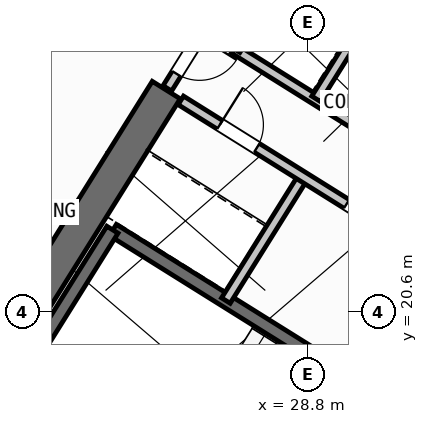
"""IFC4 building model, lengths in metres.
Left out: names, types, materials, properties, quantities, classifications, styles, units other than length and angle.
Written with IfcOpenShell. Run it as: python <this file> out.ifc"""

import sys

from ifc_helpers import new_model, si_unit, direction, frame, frame_2d, origin, place, context, subcontext, project, spatial, rectangle, extrude, source, transform, mapped, element, fill, save


model = new_model("IFC4")
c1 = context("Model", 3, precision=1e-05, world=origin(), true_north=direction((0.0, 1.0)))
c2 = subcontext(c1, "Body", "Model", "MODEL_VIEW")
j1 = project(units=[si_unit("LENGTHUNIT", "METRE"), si_unit("PLANEANGLEUNIT", "RADIAN")], contexts=[c1])
p1 = place(None, origin())
s1 = spatial("IfcSite", under=j1, at=p1, CompositionType="ELEMENT")
p2 = place(p1, origin())
s2 = spatial("IfcBuilding", under=s1, at=p2, CompositionType="ELEMENT")
p3 = place(p2, frame((0.0, 0.0, 27.6)))
s3 = spatial("IfcBuildingStorey", under=s2, at=p3, CompositionType="ELEMENT", Elevation=27.6)
p4 = place(p3, frame((40.615, 23.983, 0.0), z_axis=(0.0, 0.0, 1.0), x_axis=(-0.848045953968, 0.529922692436, 0.0)))
e1 = element("IfcWall", 1, at=p4, inside=s3, PredefinedType="SHEAR", context=c2, shape_type="SweptSolid", body=[
    extrude(rectangle(XDim=13.24, YDim=0.65, at=frame_2d((6.62, 0.0))), origin(), (0.0, 0.0, 1.0), 3.35),
])
p5 = place(p3, frame((26.007, 24.976, 0.0), z_axis=(0.0, 0.0, 1.0), x_axis=(-0.529916319127, -0.848049936456, 0.0)))
e2 = element("IfcWall", 2, at=p5, inside=s3, PredefinedType="SHEAR", context=c2, shape_type="SweptSolid", body=[
    extrude(rectangle(XDim=6.375, YDim=0.65, at=frame_2d((3.188, 0.0))), origin(), (0.0, 0.0, 1.0), 3.35),
])
p6 = place(p3, frame((29.268, 6.429, 0.0), z_axis=(0.0, 0.0, 1.0), x_axis=(-0.848049971435, 0.529916263149, 0.0)))
e3 = element("IfcWall", 3, at=p6, inside=s3, PredefinedType="STANDARD", context=c2, shape_type="SweptSolid", body=[
    extrude(rectangle(XDim=31.588, YDim=0.32, at=frame_2d((15.794, 0.0))), origin(), (0.0, 0.0, 1.0), 3.35),
])
p7 = place(p6, frame((16.362, 0.0, 0.0)))
e4 = element("IfcOpeningElement", 4, at=p7, cuts=e3, PredefinedType="OPENING", context=c2, shape_type="SweptSolid", body=[
    extrude(rectangle(XDim=1.2, YDim=2.15, at=frame_2d((0.6, 1.075))), frame((0.0, 0.17, 0.0), z_axis=(0.0, -1.0, 0.0), x_axis=(1.0, 0.0, 0.0)), (0.0, 0.0, 1.0), 0.34),
])
p8 = place(p6, frame((2.989, 0.0, 0.8)))
e5 = element("IfcOpeningElement", 5, at=p8, cuts=e3, PredefinedType="OPENING", context=c2, shape_type="SweptSolid", body=[
    extrude(rectangle(XDim=2.1, YDim=1.55, at=frame_2d((1.05, 0.775))), frame((0.0, 0.17, 0.0), z_axis=(0.0, -1.0, 0.0), x_axis=(1.0, 0.0, 0.0)), (0.0, 0.0, 1.0), 0.34),
])
p9 = place(p6, frame((8.359, 0.0, 0.8)))
e6 = element("IfcOpeningElement", 6, at=p9, cuts=e3, PredefinedType="OPENING", context=c2, shape_type="SweptSolid", body=[
    extrude(rectangle(XDim=2.1, YDim=1.55, at=frame_2d((1.05, 0.775))), frame((0.0, 0.17, 0.0), z_axis=(0.0, -1.0, 0.0), x_axis=(1.0, 0.0, 0.0)), (0.0, 0.0, 1.0), 0.34),
])
p10 = place(p6, frame((13.284, 0.0, 0.95)))
e7 = element("IfcOpeningElement", 7, at=p10, cuts=e3, PredefinedType="OPENING", context=c2, shape_type="SweptSolid", body=[
    extrude(rectangle(XDim=1.2, YDim=1.4, at=frame_2d((0.6, 0.7))), frame((0.0, 0.17, 0.0), z_axis=(0.0, -1.0, 0.0), x_axis=(1.0, 0.0, 0.0)), (0.0, 0.0, 1.0), 0.34),
])
p11 = place(p6, frame((29.188, 0.0, 0.95)))
e8 = element("IfcOpeningElement", 8, at=p11, cuts=e3, PredefinedType="OPENING", context=c2, shape_type="SweptSolid", body=[
    extrude(rectangle(XDim=1.2, YDim=1.4, at=frame_2d((0.6, 0.7))), frame((0.0, 0.17, 0.0), z_axis=(0.0, -1.0, 0.0), x_axis=(1.0, 0.0, 0.0)), (0.0, 0.0, 1.0), 0.34),
])
p12 = place(p6, frame((19.11, 0.0, 1.0)))
e9 = element("IfcOpeningElement", 9, at=p12, cuts=e3, PredefinedType="OPENING", context=c2, shape_type="SweptSolid", body=[
    extrude(rectangle(XDim=0.9, YDim=1.25, at=frame_2d((0.45, 0.625))), frame((0.0, 0.17, 0.0), z_axis=(0.0, -1.0, 0.0), x_axis=(1.0, 0.0, 0.0)), (0.0, 0.0, 1.0), 0.34),
])
p13 = place(p6, frame((21.226, 0.0, 1.0)))
e10 = element("IfcOpeningElement", 10, at=p13, cuts=e3, PredefinedType="OPENING", context=c2, shape_type="SweptSolid", body=[
    extrude(rectangle(XDim=0.9, YDim=1.25, at=frame_2d((0.45, 0.625))), frame((0.0, 0.17, 0.0), z_axis=(0.0, -1.0, 0.0), x_axis=(1.0, 0.0, 0.0)), (0.0, 0.0, 1.0), 0.34),
])
p14 = place(p6, frame((23.014, 0.0, 1.0)))
e11 = element("IfcOpeningElement", 11, at=p14, cuts=e3, PredefinedType="OPENING", context=c2, shape_type="SweptSolid", body=[
    extrude(rectangle(XDim=0.9, YDim=1.25, at=frame_2d((0.45, 0.625))), frame((0.0, 0.17, 0.0), z_axis=(0.0, -1.0, 0.0), x_axis=(1.0, 0.0, 0.0)), (0.0, 0.0, 1.0), 0.34),
])
p15 = place(p6, frame((24.802, 0.0, 1.0)))
e12 = element("IfcOpeningElement", 12, at=p15, cuts=e3, PredefinedType="OPENING", context=c2, shape_type="SweptSolid", body=[
    extrude(rectangle(XDim=0.9, YDim=1.25, at=frame_2d((0.45, 0.625))), frame((0.0, 0.17, 0.0), z_axis=(0.0, -1.0, 0.0), x_axis=(1.0, 0.0, 0.0)), (0.0, 0.0, 1.0), 0.34),
])
p16 = place(p6, frame((26.59, 0.0, 1.0)))
e13 = element("IfcOpeningElement", 13, at=p16, cuts=e3, PredefinedType="OPENING", context=c2, shape_type="SweptSolid", body=[
    extrude(rectangle(XDim=0.9, YDim=1.25, at=frame_2d((0.45, 0.625))), frame((0.0, 0.17, 0.0), z_axis=(0.0, -1.0, 0.0), x_axis=(1.0, 0.0, 0.0)), (0.0, 0.0, 1.0), 0.34),
])
p17 = place(p3, frame((14.138, 41.825, 0.0), z_axis=(0.0, 0.0, 1.0), x_axis=(0.848046498049, -0.529921821731, 0.0)))
e14 = element("IfcWall", 14, at=p17, inside=s3, PredefinedType="STANDARD", context=c2, shape_type="SweptSolid", body=[
    extrude(rectangle(XDim=31.588, YDim=0.32, at=frame_2d((15.794, 0.0))), origin(), (0.0, 0.0, 1.0), 3.35),
])
p18 = place(p17, frame((3.369, 0.0, 0.0)))
e15 = element("IfcOpeningElement", 15, at=p18, cuts=e14, PredefinedType="OPENING", context=c2, shape_type="SweptSolid", body=[
    extrude(rectangle(XDim=1.05, YDim=2.15, at=frame_2d((0.525, 1.075))), frame((0.0, 0.17, 0.0), z_axis=(0.0, -1.0, 0.0), x_axis=(1.0, 0.0, 0.0)), (0.0, 0.0, 1.0), 0.34),
])
p19 = place(p17, frame((0.946, 0.0, 0.85)))
e16 = element("IfcOpeningElement", 16, at=p19, cuts=e14, PredefinedType="OPENING", context=c2, shape_type="SweptSolid", body=[
    extrude(rectangle(XDim=1.8, YDim=1.5, at=frame_2d((0.9, 0.75))), frame((0.0, 0.17, 0.0), z_axis=(0.0, -1.0, 0.0), x_axis=(1.0, 0.0, 0.0)), (0.0, 0.0, 1.0), 0.34),
])
p20 = place(p17, frame((8.46, 0.0, 0.85)))
e17 = element("IfcOpeningElement", 17, at=p20, cuts=e14, PredefinedType="OPENING", context=c2, shape_type="SweptSolid", body=[
    extrude(rectangle(XDim=1.8, YDim=1.5, at=frame_2d((0.9, 0.75))), frame((0.0, 0.17, 0.0), z_axis=(0.0, -1.0, 0.0), x_axis=(1.0, 0.0, 0.0)), (0.0, 0.0, 1.0), 0.34),
])
p21 = place(p17, frame((13.899, 0.0, 0.85)))
e18 = element("IfcOpeningElement", 18, at=p21, cuts=e14, PredefinedType="OPENING", context=c2, shape_type="SweptSolid", body=[
    extrude(rectangle(XDim=1.5, YDim=1.5, at=frame_2d((0.75, 0.75))), frame((0.0, 0.17, 0.0), z_axis=(0.0, -1.0, 0.0), x_axis=(1.0, 0.0, 0.0)), (0.0, 0.0, 1.0), 0.34),
])
p22 = place(p17, frame((22.019, 0.0, 0.95)))
e19 = element("IfcOpeningElement", 19, at=p22, cuts=e14, PredefinedType="OPENING", context=c2, shape_type="SweptSolid", body=[
    extrude(rectangle(XDim=1.2, YDim=1.4, at=frame_2d((0.6, 0.7))), frame((0.0, 0.17, 0.0), z_axis=(0.0, -1.0, 0.0), x_axis=(1.0, 0.0, 0.0)), (0.0, 0.0, 1.0), 0.34),
])
p23 = place(p17, frame((27.569, 0.0, 0.95)))
e20 = element("IfcOpeningElement", 20, at=p23, cuts=e14, PredefinedType="OPENING", context=c2, shape_type="SweptSolid", body=[
    extrude(rectangle(XDim=1.2, YDim=1.4, at=frame_2d((0.6, 0.7))), frame((0.0, 0.17, 0.0), z_axis=(0.0, -1.0, 0.0), x_axis=(1.0, 0.0, 0.0)), (0.0, 0.0, 1.0), 0.34),
])
p24 = place(p3, frame((31.28, 18.261, 0.0), z_axis=(0.0, 0.0, 1.0), x_axis=(-0.848051618787, 0.529913626805, 0.0)))
e21 = element("IfcWall", 21, at=p24, inside=s3, PredefinedType="SHEAR", context=c2, shape_type="SweptSolid", body=[
    extrude(rectangle(XDim=7.46, YDim=0.26, at=frame_2d((3.73, 0.0))), origin(), (0.0, 0.0, 1.0), 3.35),
])
p25 = place(p24, frame((0.36, 0.0, 0.0)))
e22 = element("IfcOpeningElement", 22, at=p25, cuts=e21, PredefinedType="OPENING", context=c2, shape_type="SweptSolid", body=[
    extrude(rectangle(XDim=0.86, YDim=2.05, at=frame_2d((0.43, 1.025))), frame((0.0, 0.14, 0.0), z_axis=(0.0, -1.0, 0.0), x_axis=(1.0, 0.0, 0.0)), (0.0, 0.0, 1.0), 0.28),
])
p26 = place(p3, frame((24.945, 22.22, 0.0), z_axis=(0.0, 0.0, 1.0), x_axis=(-0.529908658664, -0.84805472316, 0.0)))
e23 = element("IfcWall", 23, at=p26, inside=s3, PredefinedType="SHEAR", context=c2, shape_type="SweptSolid", body=[
    extrude(rectangle(XDim=3.16, YDim=0.26, at=frame_2d((1.58, 0.0))), origin(), (0.0, 0.0, 1.0), 3.35),
])
p27 = place(p3, frame((31.822, 24.998, 0.0), z_axis=(0.0, 0.0, 1.0), x_axis=(-0.848058348634, 0.529902856485, 0.0)))
e24 = element("IfcWall", 24, at=p27, inside=s3, PredefinedType="STANDARD", context=c2, shape_type="SweptSolid", body=[
    extrude(rectangle(XDim=4.568, YDim=0.2, at=frame_2d((2.284, 0.0))), origin(), (0.0, 0.0, 1.0), 3.34),
])
p28 = place(p3, frame((32.108, 22.814, 0.0), z_axis=(0.0, 0.0, 1.0), x_axis=(-0.848042229521, 0.529928652696, 0.0)))
e25 = element("IfcWall", 25, at=p28, inside=s3, PredefinedType="STANDARD", context=c2, shape_type="SweptSolid", body=[
    extrude(rectangle(XDim=5.62, YDim=0.2, at=frame_2d((2.81, 0.0))), origin(), (0.0, 0.0, 1.0), 3.34),
])
p29 = place(p3, frame((28.25, 27.17, 0.0), z_axis=(0.0, 0.0, 1.0), x_axis=(-0.529905827651, -0.848056492117, 0.0)))
e26 = element("IfcWall", 26, at=p29, inside=s3, PredefinedType="STANDARD", context=c2, shape_type="SweptSolid", body=[
    extrude(rectangle(XDim=1.65, YDim=0.2, at=frame_2d((0.825, 0.0))), origin(), (0.0, 0.0, 1.0), 3.34),
])
p30 = place(p3, frame((29.801, 26.142, 0.0), z_axis=(0.0, 0.0, 1.0), x_axis=(-0.529998940003, -0.847998304005, 0.0)))
e27 = element("IfcWall", 27, at=p30, inside=s3, PredefinedType="STANDARD", context=c2, shape_type="SweptSolid", body=[
    extrude(rectangle(XDim=1.58, YDim=0.2, at=frame_2d((0.79, 0.0))), origin(), (0.0, 0.0, 1.0), 3.34),
])
p31 = place(p3, frame((28.71, 23.263, 0.0), z_axis=(0.0, 0.0, 1.0), x_axis=(-0.529907497854, -0.848055448493, 0.0)))
e28 = element("IfcWall", 28, at=p31, inside=s3, PredefinedType="STANDARD", context=c2, shape_type="SweptSolid", body=[
    extrude(rectangle(XDim=2.88, YDim=0.2, at=frame_2d((1.44, 0.0))), origin(), (0.0, 0.0, 1.0), 3.34),
])
p32 = place(p3, frame((31.525, 21.504, 0.0), z_axis=(0.0, 0.0, 1.0), x_axis=(-0.848044998614, 0.529924221305, 0.0)))
e29 = element("IfcWall", 29, at=p32, inside=s3, PredefinedType="STANDARD", context=c2, shape_type="SweptSolid", body=[
    extrude(rectangle(XDim=6.168, YDim=0.2, at=frame_2d((3.084, 0.0))), origin(), (0.0, 0.0, 1.0), 3.34),
])
p33 = place(p32, frame((4.4, 0.0, 0.0)))
e30 = element("IfcOpeningElement", 30, at=p33, cuts=e29, PredefinedType="OPENING", context=c2, shape_type="SweptSolid", body=[
    extrude(rectangle(XDim=0.86, YDim=2.05, at=frame_2d((0.43, 1.025))), frame((0.0, 0.11, 0.0), z_axis=(0.0, -1.0, 0.0), x_axis=(1.0, 0.0, 0.0)), (0.0, 0.0, 1.0), 0.22),
])
p34 = place(p32, frame((1.45, 0.0, 0.0)))
e31 = element("IfcOpeningElement", 31, at=p34, cuts=e29, PredefinedType="OPENING", context=c2, shape_type="SweptSolid", body=[
    extrude(rectangle(XDim=0.86, YDim=2.05, at=frame_2d((0.43, 1.025))), frame((0.0, 0.11, 0.0), z_axis=(0.0, -1.0, 0.0), x_axis=(1.0, 0.0, 0.0)), (0.0, 0.0, 1.0), 0.22),
])
p35 = place(p3, frame((27.596, 27.52, 0.0), z_axis=(0.0, 0.0, 1.0), x_axis=(-0.529865479138, -0.848081702443, 0.0)))
e32 = element("IfcWall", 32, at=p35, inside=s3, PredefinedType="STANDARD", context=c2, shape_type="SweptSolid", body=[
    extrude(rectangle(XDim=2.96, YDim=0.2, at=frame_2d((1.48, 0.0))), origin(), (0.0, 0.0, 1.0), 3.34),
])
p36 = place(p35, frame((1.76, 0.0, 0.0)))
e33 = element("IfcOpeningElement", 33, at=p36, cuts=e32, PredefinedType="OPENING", context=c2, shape_type="SweptSolid", body=[
    extrude(rectangle(XDim=0.86, YDim=2.05, at=frame_2d((0.43, 1.025))), frame((0.0, 0.11, 0.0), z_axis=(0.0, -1.0, 0.0), x_axis=(1.0, 0.0, 0.0)), (0.0, 0.0, 1.0), 0.22),
])
p37 = place(p3, frame((24.588, 27.631, 0.0), z_axis=(0.0, 0.0, 1.0), x_axis=(-0.529914586043, -0.848051019396, 0.0)))
e34 = element("IfcWall", 34, at=p37, inside=s3, PredefinedType="PARTITIONING", context=c2, shape_type="SweptSolid", body=[
    extrude(rectangle(XDim=15.35, YDim=0.16, at=frame_2d((7.675, 0.0))), origin(), (0.0, 0.0, 1.0), 3.34),
])
m1 = source(origin(), c2, "Body", "SweptSolid", [
    extrude(rectangle(XDim=0.86, YDim=2.05, at=frame_2d((0.43, 1.025))), frame((0.0, 0.025, 0.0), z_axis=(0.0, -1.0, 0.0), x_axis=(1.0, 0.0, 0.0)), (0.0, 0.0, 1.0), 0.05),
])
p38 = place(p33, frame((0.86, 0.0, 0.0), z_axis=(0.0, 0.0, 1.0), x_axis=(-1.0, 0.0, 0.0)))
e35 = element("IfcDoor", 35, at=p38, inside=s3, OperationType="SINGLE_SWING_LEFT", PredefinedType="DOOR", context=c2, shape_type="MappedRepresentation", body=[
    mapped(m1, transform((0.0, 0.0, 0.0), scale=1.0)),
])
fill(e30, e35)
p39 = place(p34, frame((0.86, 0.0, 0.0), z_axis=(0.0, 0.0, 1.0), x_axis=(-1.0, 0.0, 0.0)))
e36 = element("IfcDoor", 36, at=p39, inside=s3, OperationType="SINGLE_SWING_RIGHT", PredefinedType="DOOR", context=c2, shape_type="MappedRepresentation", body=[
    mapped(m1, transform((0.0, 0.0, 0.0), scale=1.0)),
])
fill(e31, e36)
p40 = place(p36, origin())
e37 = element("IfcDoor", 37, at=p40, inside=s3, OperationType="SINGLE_SWING_LEFT", PredefinedType="DOOR", context=c2, shape_type="MappedRepresentation", body=[
    mapped(m1, transform((0.0, 0.0, 0.0), scale=1.0)),
])
fill(e33, e37)
save(model, sys.argv[1])
